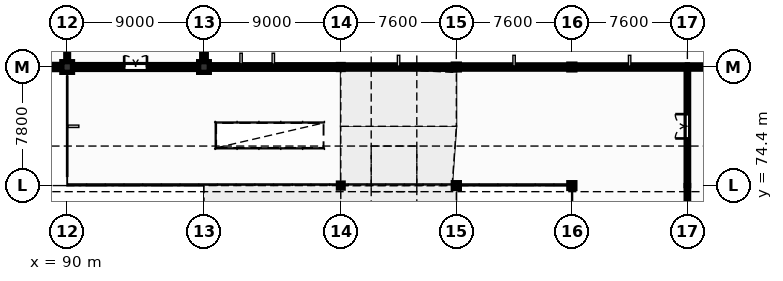
"""IFC4 building model, lengths in metres.
Left out: names, types, materials, properties, quantities, classifications, styles, units other than length and angle.
Written with IfcOpenShell. Run it as: python <this file> out.ifc"""

import sys

from ifc_helpers import new_model, si_unit, direction, frame, frame_2d, origin, origin_2d, place, context, subcontext, project, spatial, polyline, rectangle, i_section, outline, extrude, element, fill, save


model = new_model("IFC4")
c1 = context("Model", 3, precision=1e-05, world=origin(), true_north=direction((0.0, 1.0)))
c2 = subcontext(c1, "Body", "Model", "MODEL_VIEW")
j1 = project(units=[si_unit("LENGTHUNIT", "METRE"), si_unit("PLANEANGLEUNIT", "RADIAN")], contexts=[c1])
p1 = place(None, origin())
s1 = spatial("IfcSite", under=j1, at=p1, CompositionType="ELEMENT")
p2 = place(p1, origin())
s2 = spatial("IfcBuilding", under=s1, at=p2, CompositionType="ELEMENT")
p3 = place(p2, frame((0.0, 0.0, 12.78)))
s3 = spatial("IfcBuildingStorey", under=s2, at=p3, CompositionType="ELEMENT", Elevation=12.78)
for number, where, z_axis, x_axis in (
    (1, (90.0, 82.2, 0.0), (0.0, 0.0, 1.0), (1.0, 0.0, 0.0)),
    (2, (99.0, 82.2, 0.0), (0.0, 0.0, 1.0), (1.0, 0.0, 0.0)),
):
    element("IfcColumn", number, at=place(p3, frame(where, z_axis=z_axis, x_axis=x_axis)), inside=s3, PredefinedType="COLUMN", context=c2, shape_type="SweptSolid", body=[
        extrude(rectangle(XDim=0.7, YDim=0.7, at=origin_2d()), origin(), (0.0, 0.0, 1.0), 3.74),
    ])
for number, where, z_axis, x_axis in (
    (3, (108.0, 74.4, 0.0), (0.0, 0.0, 1.0), (1.0, 0.0, 0.0)),
    (4, (108.0, 82.2, 0.0), (0.0, 0.0, 1.0), (1.0, 0.0, 0.0)),
):
    element("IfcColumn", number, at=place(p3, frame(where, z_axis=z_axis, x_axis=x_axis)), inside=s3, PredefinedType="COLUMN", context=c2, shape_type="SweptSolid", body=[
        extrude(i_section(OverallWidth=0.31, OverallDepth=0.328, WebThickness=0.015, FlangeThickness=0.025, at=origin_2d()), origin(), (0.0, 0.0, 1.0), 3.74),
    ])
for number, where, z_axis, x_axis in (
    (5, (115.6, 74.4, 0.0), (0.0, 0.0, 1.0), (1.0, 0.0, 0.0)),
    (6, (115.6, 82.2, 0.0), (0.0, 0.0, 1.0), (1.0, 0.0, 0.0)),
):
    element("IfcColumn", number, at=place(p3, frame(where, z_axis=z_axis, x_axis=x_axis)), inside=s3, PredefinedType="COLUMN", context=c2, shape_type="SweptSolid", body=[
        extrude(i_section(OverallWidth=0.396, OverallDepth=0.381, WebThickness=0.019, FlangeThickness=0.03, at=origin_2d()), origin(), (0.0, 0.0, 1.0), 2.957),
    ])
p4 = place(p3, frame((123.2, 74.4, 0.0), z_axis=(0.0, 0.0, 1.0), x_axis=(1.0, 0.0, 0.0)))
e7 = element("IfcColumn", 7, at=p4, inside=s3, PredefinedType="COLUMN", context=c2, shape_type="SweptSolid", body=[
    extrude(i_section(OverallWidth=0.396, OverallDepth=0.381, WebThickness=0.019, FlangeThickness=0.03, at=origin_2d()), origin(), (0.0, 0.0, 1.0), 4.474),
])
p5 = place(p3, frame((123.2, 82.2, 0.0), z_axis=(0.0, 0.0, 1.0), x_axis=(1.0, 0.0, 0.0)))
e8 = element("IfcColumn", 8, at=p5, inside=s3, PredefinedType="COLUMN", context=c2, shape_type="SweptSolid", body=[
    extrude(i_section(OverallWidth=0.396, OverallDepth=0.381, WebThickness=0.019, FlangeThickness=0.03, at=origin_2d()), origin(), (0.0, 0.0, 1.0), 4.754),
])
p6 = place(p3, frame((81.0, 82.2, 0.0), z_axis=(0.0, 0.0, 1.0), x_axis=(1.0, 0.0, 0.0)))
e9 = element("IfcWall", 9, at=p6, inside=s3, PredefinedType="SOLIDWALL", context=c2, shape_type="SweptSolid", body=[
    extrude(rectangle(XDim=9.0, YDim=0.34, at=frame_2d((4.5, 0.0))), origin(), (0.0, 0.0, 1.0), 3.42),
])
p7 = place(p6, frame((1.8, 0.0, 0.85)))
e10 = element("IfcOpeningElement", 10, at=p7, cuts=e9, PredefinedType="OPENING", context=c2, shape_type="SweptSolid", body=[
    extrude(rectangle(XDim=2.4, YDim=1.1, at=frame_2d((1.2, 0.55))), frame((0.0, 0.18, 0.0), z_axis=(0.0, -1.0, 0.0), x_axis=(1.0, 0.0, 0.0)), (0.0, 0.0, 1.0), 0.36),
])
p8 = place(p6, frame((5.4, 0.0, 0.665)))
e11 = element("IfcOpeningElement", 11, at=p8, cuts=e9, PredefinedType="OPENING", context=c2, shape_type="SweptSolid", body=[
    extrude(rectangle(XDim=1.2, YDim=2.1, at=frame_2d((0.6, 1.05))), frame((0.0, 0.18, 0.0), z_axis=(0.0, -1.0, 0.0), x_axis=(1.0, 0.0, 0.0)), (0.0, 0.0, 1.0), 0.36),
])
p9 = place(p3, frame((99.0, 82.2, 0.0), z_axis=(0.0, 0.0, 1.0), x_axis=(0.0, 1.0, 0.0)))
e12 = element("IfcWall", 12, at=p9, inside=s3, PredefinedType="SOLIDWALL", context=c2, shape_type="SweptSolid", body=[
    extrude(rectangle(XDim=13.4, YDim=0.3, at=frame_2d((6.7, 0.0))), origin(), (0.0, 0.0, 1.0), 2.685),
])
p10 = place(p9, frame((2.6, 0.0, 0.465)))
e13 = element("IfcOpeningElement", 13, at=p10, cuts=e12, PredefinedType="OPENING", context=c2, shape_type="SweptSolid", body=[
    extrude(rectangle(XDim=1.5, YDim=2.1, at=frame_2d((0.75, 1.05))), frame((0.0, 0.16, 0.0), z_axis=(0.0, -1.0, 0.0), x_axis=(1.0, 0.0, 0.0)), (0.0, 0.0, 1.0), 0.32),
])
p11 = place(p9, frame((9.15, 0.0, 0.465)))
e14 = element("IfcOpeningElement", 14, at=p11, cuts=e12, PredefinedType="OPENING", context=c2, shape_type="SweptSolid", body=[
    extrude(rectangle(XDim=1.2, YDim=2.1, at=frame_2d((0.6, 1.05))), frame((0.0, 0.16, 0.0), z_axis=(0.0, -1.0, 0.0), x_axis=(1.0, 0.0, 0.0)), (0.0, 0.0, 1.0), 0.32),
])
p12 = place(p3, frame((99.0, 82.2, 0.0), z_axis=(0.0, 0.0, 1.0), x_axis=(1.0, 0.0, 0.0)))
e15 = element("IfcWall", 15, at=p12, inside=s3, PredefinedType="SOLIDWALL", context=c2, shape_type="SweptSolid", body=[
    extrude(rectangle(XDim=9.0, YDim=0.3, at=frame_2d((4.5, 0.0))), origin(), (0.0, 0.0, 1.0), 2.853),
])
p13 = place(p12, frame((2.6, 0.0, 0.633)))
e16 = element("IfcOpeningElement", 16, at=p13, cuts=e15, PredefinedType="OPENING", context=c2, shape_type="SweptSolid", body=[
    extrude(rectangle(XDim=1.8, YDim=2.1, at=frame_2d((0.9, 1.05))), frame((0.0, 0.16, 0.0), z_axis=(0.0, -1.0, 0.0), x_axis=(1.0, 0.0, 0.0)), (0.0, 0.0, 1.0), 0.32),
])
p14 = place(p3, frame((108.0, 82.2, 1.68), z_axis=(0.0, 0.0, 1.0), x_axis=(1.0, 0.0, 0.0)))
e17 = element("IfcWall", 17, at=p14, inside=s3, PredefinedType="SOLIDWALL", context=c2, shape_type="SweptSolid", body=[
    extrude(outline(polyline([(0.0, 0.0), (7.6, 0.0), (7.6, 1.617), (0.0, 0.1), (0.0, 0.0)])), frame((0.0, 0.14, 0.0), z_axis=(0.0, -1.0, 0.0), x_axis=(1.0, 0.0, 0.0)), (0.0, 0.0, 1.0), 0.28),
])
p15 = place(p3, frame((115.6, 82.2, 3.197), z_axis=(0.0, 0.0, 1.0), x_axis=(1.0, 0.0, 0.0)))
e18 = element("IfcWall", 18, at=p15, inside=s3, PredefinedType="SOLIDWALL", context=c2, shape_type="SweptSolid", body=[
    extrude(outline(polyline([(0.0, 0.0), (7.6, 0.0), (7.6, 1.617), (0.0, 0.1), (0.0, 0.0)])), frame((0.0, 0.14, 0.0), z_axis=(0.0, -1.0, 0.0), x_axis=(1.0, 0.0, 0.0)), (0.0, 0.0, 1.0), 0.28),
])
p16 = place(p3, frame((123.2, 82.2, 4.714), z_axis=(0.0, 0.0, 1.0), x_axis=(1.0, 0.0, 0.0)))
e19 = element("IfcWall", 19, at=p16, inside=s3, PredefinedType="SOLIDWALL", context=c2, shape_type="SweptSolid", body=[
    extrude(outline(polyline([(0.0, 0.0), (7.6, 0.0), (7.6, 1.617), (0.0, 0.1), (0.0, 0.0)])), frame((0.0, 0.14, 0.0), z_axis=(0.0, -1.0, 0.0), x_axis=(1.0, 0.0, 0.0)), (0.0, 0.0, 1.0), 0.28),
])
p17 = place(p3, frame((130.8, 82.2, 4.714), z_axis=(0.0, 0.0, 1.0), x_axis=(1.0, 0.0, 0.0)))
e20 = element("IfcWall", 20, at=p17, inside=s3, PredefinedType="SOLIDWALL", context=c2, shape_type="SweptSolid", body=[
    extrude(outline(polyline([(0.0, 0.0), (7.6, 0.0), (7.6, 3.134), (0.0, 1.617), (0.0, 0.0)])), frame((0.0, 0.14, 0.0), z_axis=(0.0, -1.0, 0.0), x_axis=(1.0, 0.0, 0.0)), (0.0, 0.0, 1.0), 0.28),
])
p18 = place(p3, frame((90.0, 82.2, 0.0), z_axis=(0.0, 0.0, 1.0), x_axis=(1.0, 0.0, 0.0)))
e21 = element("IfcWall", 21, at=p18, inside=s3, PredefinedType="SHEAR", context=c2, shape_type="SweptSolid", body=[
    extrude(rectangle(XDim=9.0, YDim=0.32, at=frame_2d((4.5, 0.0))), origin(), (0.0, 0.0, 1.0), 3.42),
])
p19 = place(p18, frame((3.75, 0.0, 0.0)))
e22 = element("IfcOpeningElement", 22, at=p19, cuts=e21, PredefinedType="OPENING", context=c2, shape_type="SweptSolid", body=[
    extrude(rectangle(XDim=1.5, YDim=2.2, at=frame_2d((0.75, 1.1))), frame((0.0, 0.17, 0.0), z_axis=(0.0, -1.0, 0.0), x_axis=(1.0, 0.0, 0.0)), (0.0, 0.0, 1.0), 0.34),
])
p20 = place(p3, frame((130.8, 43.2, 0.0), z_axis=(0.0, 0.0, 1.0), x_axis=(0.0, 1.0, 0.0)))
e23 = element("IfcWall", 23, at=p20, inside=s3, PredefinedType="PARTITIONING", context=c2, shape_type="SweptSolid", body=[
    extrude(rectangle(XDim=31.2, YDim=0.16, at=frame_2d((15.6, 0.0))), origin(), (0.0, 0.0, 1.0), 3.42),
])
p21 = place(p3, frame((130.8, 74.4, 0.0), z_axis=(0.0, 0.0, 1.0), x_axis=(0.0, 1.0, 0.0)))
e24 = element("IfcWall", 24, at=p21, inside=s3, PredefinedType="PARTITIONING", context=c2, shape_type="SweptSolid", body=[
    extrude(rectangle(XDim=7.8, YDim=0.16, at=frame_2d((3.9, 0.0))), origin(), (0.0, 0.0, 1.0), 3.42),
])
p22 = place(p21, frame((3.1, 0.0, 0.0)))
e25 = element("IfcOpeningElement", 25, at=p22, cuts=e24, PredefinedType="OPENING", context=c2, shape_type="SweptSolid", body=[
    extrude(rectangle(XDim=1.6, YDim=2.2, at=frame_2d((0.8, 1.1))), frame((0.0, 0.09, 0.0), z_axis=(0.0, -1.0, 0.0), x_axis=(1.0, 0.0, 0.0)), (0.0, 0.0, 1.0), 0.18),
])
p23 = place(p3, frame((90.0, 82.2, 0.0), z_axis=(0.0, 0.0, 1.0), x_axis=(0.0, 1.0, 0.0)))
e26 = element("IfcWall", 26, at=p23, inside=s3, PredefinedType="PLUMBINGWALL", context=c2, shape_type="SweptSolid", body=[
    extrude(rectangle(XDim=13.4, YDim=0.18, at=frame_2d((6.7, 0.0))), origin(), (0.0, 0.0, 1.0), 2.805),
])
p24 = place(p13, origin())
e27 = element("IfcWindow", 27, at=p24, inside=s3, PartitioningType="SINGLE_PANEL", PredefinedType="WINDOW", context=c2, shape_type="SweptSolid", body=[
    extrude(rectangle(XDim=1.8, YDim=2.1, at=frame_2d((0.9, 1.05))), frame((0.0, 0.03, 0.0), z_axis=(0.0, -1.0, 0.0), x_axis=(1.0, 0.0, 0.0)), (0.0, 0.0, 1.0), 0.06),
])
fill(e16, e27)
p25 = place(p19, origin())
e28 = element("IfcDoor", 28, at=p25, inside=s3, OperationType="DOUBLE_DOOR_SINGLE_SWING", PredefinedType="DOOR", context=c2, shape_type="SweptSolid", body=[
    extrude(rectangle(XDim=1.5, YDim=2.2, at=frame_2d((0.75, 1.1))), frame((0.0, 0.025, 0.0), z_axis=(0.0, -1.0, 0.0), x_axis=(1.0, 0.0, 0.0)), (0.0, 0.0, 1.0), 0.05),
])
fill(e22, e28)
p26 = place(p22, origin())
e29 = element("IfcDoor", 29, at=p26, inside=s3, OperationType="DOUBLE_DOOR_SINGLE_SWING", PredefinedType="DOOR", context=c2, shape_type="SweptSolid", body=[
    extrude(rectangle(XDim=1.6, YDim=2.2, at=frame_2d((0.8, 1.1))), frame((0.0, 0.025, 0.0), z_axis=(0.0, -1.0, 0.0), x_axis=(1.0, 0.0, 0.0)), (0.0, 0.0, 1.0), 0.05),
])
fill(e25, e29)
save(model, sys.argv[1])
